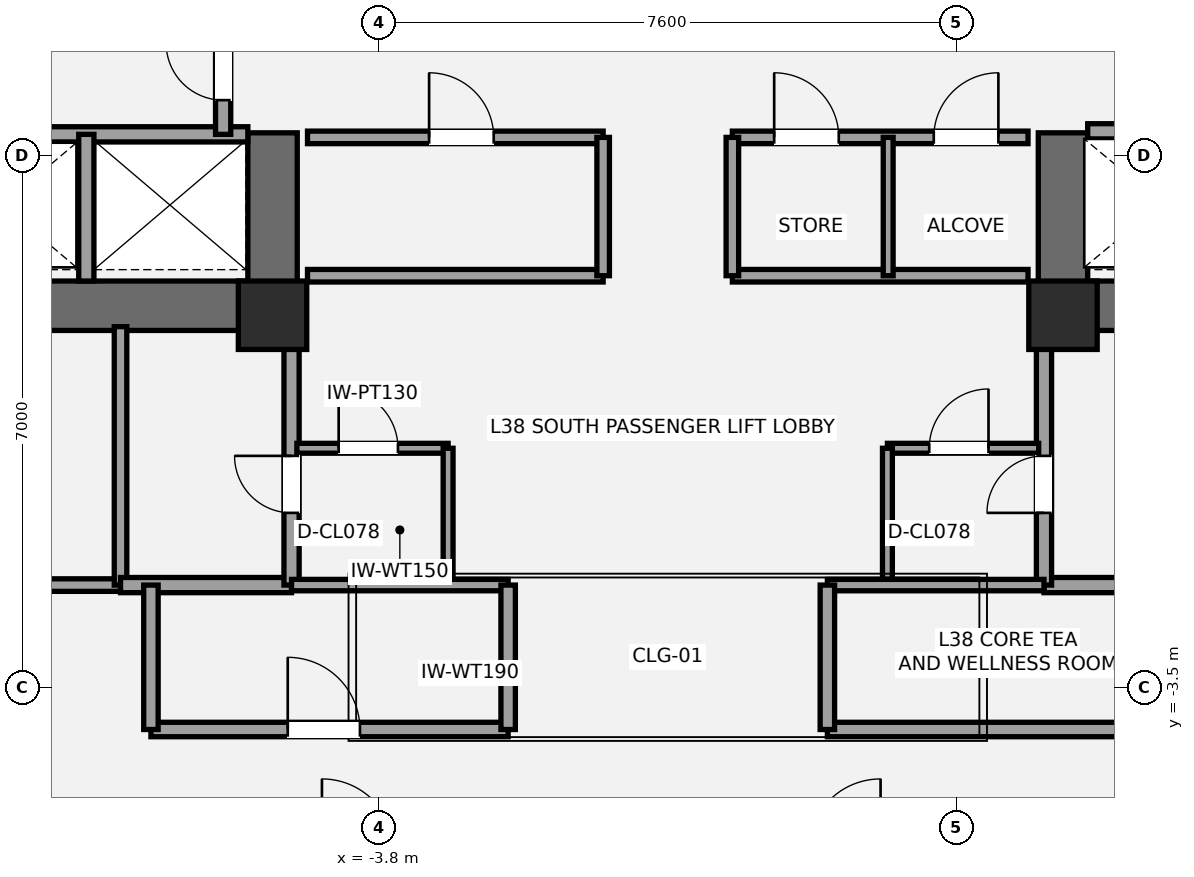
"""IFC4 building model, lengths in metres.
Left out: names, types, materials, properties, quantities, classifications, styles, units other than length and angle.
Written with IfcOpenShell. Run it as: python <this file> out.ifc"""

import sys

from ifc_helpers import new_model, si_unit, direction, frame, frame_2d, origin, origin_2d, place, context, subcontext, project, spatial, rectangle, extrude, element, fill, save


model = new_model("IFC4")
c1 = context("Model", 3, precision=1e-05, world=origin(), true_north=direction((0.0, 1.0)))
c2 = subcontext(c1, "Body", "Model", "MODEL_VIEW")
j1 = project(units=[si_unit("LENGTHUNIT", "METRE"), si_unit("PLANEANGLEUNIT", "RADIAN")], contexts=[c1])
p1 = place(None, origin())
s1 = spatial("IfcSite", under=j1, at=p1, CompositionType="ELEMENT")
p2 = place(p1, origin())
s2 = spatial("IfcBuilding", under=s1, at=p2, CompositionType="ELEMENT")
p3 = place(p2, frame((0.0, 0.0, 143.8)))
s3 = spatial("IfcBuildingStorey", under=s2, at=p3, CompositionType="ELEMENT", Elevation=143.8)
p4 = place(p3, frame((-4.875, 1.525, 0.0), z_axis=(0.0, 0.0, 1.0), x_axis=(-1.0, 0.0, 0.0)))
e1 = element("IfcWall", 1, at=p4, inside=s3, PredefinedType="SHEAR", context=c2, shape_type="SweptSolid", body=[
    extrude(rectangle(XDim=8.925, YDim=0.65, at=frame_2d((4.462, 0.0))), origin(), (0.0, 0.0, 1.0), 3.2),
])
p5 = place(p4, frame((5.425, 0.0, 0.0)))
e2 = element("IfcOpeningElement", 2, at=p5, cuts=e1, PredefinedType="OPENING", context=c2, shape_type="SweptSolid", body=[
    extrude(rectangle(XDim=1.05, YDim=2.15, at=frame_2d((0.525, 1.075))), frame((0.0, 0.335, 0.0), z_axis=(0.0, -1.0, 0.0), x_axis=(1.0, 0.0, 0.0)), (0.0, 0.0, 1.0), 0.67),
])
p6 = place(p4, frame((3.755, 0.0, 0.0)))
e3 = element("IfcOpeningElement", 3, at=p6, cuts=e1, PredefinedType="OPENING", context=c2, shape_type="SweptSolid", body=[
    extrude(rectangle(XDim=1.1, YDim=2.2, at=frame_2d((0.55, 1.1))), frame((0.0, 0.335, 0.0), z_axis=(0.0, -1.0, 0.0), x_axis=(1.0, 0.0, 0.0)), (0.0, 0.0, 1.0), 0.67),
])
p7 = place(p3, frame((-5.2, 1.2, 0.0), z_axis=(0.0, 0.0, 1.0), x_axis=(0.0, 1.0, 0.0)))
e4 = element("IfcWall", 4, at=p7, inside=s3, PredefinedType="SHEAR", context=c2, shape_type="SweptSolid", body=[
    extrude(rectangle(XDim=2.6, YDim=0.65, at=frame_2d((1.3, 0.0))), origin(), (0.0, 0.0, 1.0), 3.2),
])
p8 = place(p3, frame((13.8, 1.525, 0.0), z_axis=(0.0, 0.0, 1.0), x_axis=(-1.0, 0.0, 0.0)))
e5 = element("IfcWall", 5, at=p8, inside=s3, PredefinedType="SHEAR", context=c2, shape_type="SweptSolid", body=[
    extrude(rectangle(XDim=8.925, YDim=0.65, at=frame_2d((4.462, 0.0))), origin(), (0.0, 0.0, 1.0), 3.2),
])
p9 = place(p8, frame((2.45, 0.0, 0.0)))
e6 = element("IfcOpeningElement", 6, at=p9, cuts=e5, PredefinedType="OPENING", context=c2, shape_type="SweptSolid", body=[
    extrude(rectangle(XDim=1.05, YDim=2.15, at=frame_2d((0.525, 1.075))), frame((0.0, 0.335, 0.0), z_axis=(0.0, -1.0, 0.0), x_axis=(1.0, 0.0, 0.0)), (0.0, 0.0, 1.0), 0.67),
])
p10 = place(p8, frame((4.45, 0.0, 0.0)))
e7 = element("IfcOpeningElement", 7, at=p10, cuts=e5, PredefinedType="OPENING", context=c2, shape_type="SweptSolid", body=[
    extrude(rectangle(XDim=1.1, YDim=2.2, at=frame_2d((0.55, 1.1))), frame((0.0, 0.335, 0.0), z_axis=(0.0, -1.0, 0.0), x_axis=(1.0, 0.0, 0.0)), (0.0, 0.0, 1.0), 0.67),
])
p11 = place(p3, frame((5.2, 1.2, 0.0), z_axis=(0.0, 0.0, 1.0), x_axis=(0.0, 1.0, 0.0)))
e8 = element("IfcWall", 8, at=p11, inside=s3, PredefinedType="SHEAR", context=c2, shape_type="SweptSolid", body=[
    extrude(rectangle(XDim=2.6, YDim=0.65, at=frame_2d((1.3, 0.0))), origin(), (0.0, 0.0, 1.0), 3.2),
])
for number, where, z_axis, x_axis in (
    (9, (-5.2, 1.4, 0.0), (0.0, 0.0, 1.0), (1.0, 0.0, 0.0)),
    (10, (5.2, 1.4, 0.0), (0.0, 0.0, 1.0), (1.0, 0.0, 0.0)),
):
    element("IfcColumn", number, at=place(p3, frame(where, z_axis=z_axis, x_axis=x_axis)), inside=s3, PredefinedType="COLUMN", context=c2, shape_type="SweptSolid", body=[
        extrude(rectangle(XDim=0.9, YDim=0.9, at=origin_2d()), origin(), (0.0, 0.0, 1.0), 3.2),
    ])
p12 = place(p3, frame((-13.45, -2.15, 0.0), z_axis=(0.0, 0.0, 1.0), x_axis=(1.0, 0.0, 0.0)))
e11 = element("IfcWall", 11, at=p12, inside=s3, PredefinedType="PARTITIONING", context=c2, shape_type="SweptSolid", body=[
    extrude(rectangle(XDim=6.25, YDim=0.165, at=frame_2d((3.125, 0.0))), origin(), (0.0, 0.0, 1.0), 2.473),
])
p13 = place(p3, frame((-7.2, -2.15, 0.0), z_axis=(0.0, 0.0, 1.0), x_axis=(0.0, 1.0, 0.0)))
e12 = element("IfcWall", 12, at=p13, inside=s3, PredefinedType="PARTITIONING", context=c2, shape_type="SweptSolid", body=[
    extrude(rectangle(XDim=3.4, YDim=0.165, at=frame_2d((1.7, 0.0))), origin(), (0.0, 0.0, 1.0), 2.473),
])
p14 = place(p3, frame((-7.2, -2.15, 0.0), z_axis=(0.0, 0.0, 1.0), x_axis=(1.0, 0.0, 0.0)))
e13 = element("IfcWall", 13, at=p14, inside=s3, PredefinedType="SOLIDWALL", context=c2, shape_type="SweptSolid", body=[
    extrude(rectangle(XDim=2.25, YDim=0.2, at=frame_2d((1.125, 0.0))), origin(), (0.0, 0.0, 1.0), 3.02),
])
p15 = place(p3, frame((-4.95, -2.15, 0.0), z_axis=(0.0, 0.0, 1.0), x_axis=(0.0, 1.0, 0.0)))
e14 = element("IfcWall", 14, at=p15, inside=s3, PredefinedType="SOLIDWALL", context=c2, shape_type="SweptSolid", body=[
    extrude(rectangle(XDim=3.4, YDim=0.2, at=frame_2d((1.7, 0.0))), origin(), (0.0, 0.0, 1.0), 2.473),
])
p16 = place(p15, frame((0.95, 0.0, 0.0)))
e15 = element("IfcOpeningElement", 15, at=p16, cuts=e14, PredefinedType="OPENING", context=c2, shape_type="SweptSolid", body=[
    extrude(rectangle(XDim=0.75, YDim=2.1, at=frame_2d((0.375, 1.05))), frame((0.0, 0.11, 0.0), z_axis=(0.0, -1.0, 0.0), x_axis=(1.0, 0.0, 0.0)), (0.0, 0.0, 1.0), 0.22),
])
p17 = place(p3, frame((4.95, -2.15, 0.0), z_axis=(0.0, 0.0, 1.0), x_axis=(1.0, 0.0, 0.0)))
e16 = element("IfcWall", 16, at=p17, inside=s3, PredefinedType="SOLIDWALL", context=c2, shape_type="SweptSolid", body=[
    extrude(rectangle(XDim=2.25, YDim=0.2, at=frame_2d((1.125, 0.0))), origin(), (0.0, 0.0, 1.0), 3.02),
])
p18 = place(p3, frame((4.95, -2.15, 0.0), z_axis=(0.0, 0.0, 1.0), x_axis=(0.0, 1.0, 0.0)))
e17 = element("IfcWall", 17, at=p18, inside=s3, PredefinedType="SOLIDWALL", context=c2, shape_type="SweptSolid", body=[
    extrude(rectangle(XDim=3.4, YDim=0.2, at=frame_2d((1.7, 0.0))), origin(), (0.0, 0.0, 1.0), 2.473),
])
p19 = place(p18, frame((0.95, 0.0, 0.0)))
e18 = element("IfcOpeningElement", 18, at=p19, cuts=e17, PredefinedType="OPENING", context=c2, shape_type="SweptSolid", body=[
    extrude(rectangle(XDim=0.75, YDim=2.1, at=frame_2d((0.375, 1.05))), frame((0.0, 0.11, 0.0), z_axis=(0.0, -1.0, 0.0), x_axis=(1.0, 0.0, 0.0)), (0.0, 0.0, 1.0), 0.22),
])
p20 = place(p3, frame((-4.88, -0.35, 0.0), z_axis=(0.0, 0.0, 1.0), x_axis=(1.0, 0.0, 0.0)))
e19 = element("IfcWall", 19, at=p20, inside=s3, PredefinedType="PARTITIONING", context=c2, shape_type="SweptSolid", body=[
    extrude(rectangle(XDim=1.99, YDim=0.13, at=frame_2d((0.995, 0.0))), origin(), (0.0, 0.0, 1.0), 3.02),
])
p21 = place(p20, frame((0.55, 0.0, 0.0)))
e20 = element("IfcOpeningElement", 20, at=p21, cuts=e19, PredefinedType="OPENING", context=c2, shape_type="SweptSolid", body=[
    extrude(rectangle(XDim=0.78, YDim=2.1, at=frame_2d((0.39, 1.05))), frame((0.0, 0.075, 0.0), z_axis=(0.0, -1.0, 0.0), x_axis=(1.0, 0.0, 0.0)), (0.0, 0.0, 1.0), 0.15),
])
p22 = place(p3, frame((-2.89, -2.15, 0.0), z_axis=(0.0, 0.0, 1.0), x_axis=(0.0, 1.0, 0.0)))
e21 = element("IfcWall", 21, at=p22, inside=s3, PredefinedType="PARTITIONING", context=c2, shape_type="SweptSolid", body=[
    extrude(rectangle(XDim=1.8, YDim=0.13, at=frame_2d((0.9, 0.0))), origin(), (0.0, 0.0, 1.0), 3.02),
])
p23 = place(p3, frame((2.89, -0.35, 0.0), z_axis=(0.0, 0.0, 1.0), x_axis=(1.0, 0.0, 0.0)))
e22 = element("IfcWall", 22, at=p23, inside=s3, PredefinedType="PARTITIONING", context=c2, shape_type="SweptSolid", body=[
    extrude(rectangle(XDim=1.99, YDim=0.13, at=frame_2d((0.995, 0.0))), origin(), (0.0, 0.0, 1.0), 3.02),
])
p24 = place(p23, frame((0.55, 0.0, 0.0)))
e23 = element("IfcOpeningElement", 23, at=p24, cuts=e22, PredefinedType="OPENING", context=c2, shape_type="SweptSolid", body=[
    extrude(rectangle(XDim=0.78, YDim=2.1, at=frame_2d((0.39, 1.05))), frame((0.0, 0.075, 0.0), z_axis=(0.0, -1.0, 0.0), x_axis=(1.0, 0.0, 0.0)), (0.0, 0.0, 1.0), 0.15),
])
p25 = place(p3, frame((2.89, -2.15, 0.0), z_axis=(0.0, 0.0, 1.0), x_axis=(0.0, 1.0, 0.0)))
e24 = element("IfcWall", 24, at=p25, inside=s3, PredefinedType="PARTITIONING", context=c2, shape_type="SweptSolid", body=[
    extrude(rectangle(XDim=1.8, YDim=0.13, at=frame_2d((0.9, 0.0))), origin(), (0.0, 0.0, 1.0), 3.02),
])
p26 = place(p3, frame((-9.78, 3.78, 0.0), z_axis=(0.0, 0.0, 1.0), x_axis=(1.0, 0.0, 0.0)))
e25 = element("IfcWall", 25, at=p26, inside=s3, PredefinedType="SOLIDWALL", context=c2, shape_type="SweptSolid", body=[
    extrude(rectangle(XDim=4.255, YDim=0.2, at=frame_2d((2.127, 0.0))), origin(), (0.0, 0.0, 1.0), 3.02),
])
p27 = place(p3, frame((-7.65, 1.85, 0.0), z_axis=(0.0, 0.0, 1.0), x_axis=(0.0, 1.0, 0.0)))
e26 = element("IfcWall", 26, at=p27, inside=s3, PredefinedType="SOLIDWALL", context=c2, shape_type="SweptSolid", body=[
    extrude(rectangle(XDim=1.93, YDim=0.2, at=frame_2d((0.965, 0.0))), origin(), (0.0, 0.0, 1.0), 3.02),
])
p28 = place(p3, frame((-5.85, 3.78, 0.0), z_axis=(0.0, 0.0, 1.0), x_axis=(0.0, 1.0, 0.0)))
e27 = element("IfcWall", 27, at=p28, inside=s3, PredefinedType="SOLIDWALL", context=c2, shape_type="SweptSolid", body=[
    extrude(rectangle(XDim=1.69, YDim=0.2, at=frame_2d((0.845, 0.0))), origin(), (0.0, 0.0, 1.0), 3.02),
])
p29 = place(p28, frame((0.45, 0.0, 0.0)))
e28 = element("IfcOpeningElement", 28, at=p29, cuts=e27, PredefinedType="OPENING", context=c2, shape_type="SweptSolid", body=[
    extrude(rectangle(XDim=0.75, YDim=2.1, at=frame_2d((0.375, 1.05))), frame((0.0, 0.11, 0.0), z_axis=(0.0, -1.0, 0.0), x_axis=(1.0, 0.0, 0.0)), (0.0, 0.0, 1.0), 0.22),
])
p30 = place(p3, frame((5.525, 3.82, 0.0), z_axis=(0.0, 0.0, 1.0), x_axis=(1.0, 0.0, 0.0)))
e29 = element("IfcWall", 29, at=p30, inside=s3, PredefinedType="SOLIDWALL", context=c2, shape_type="SweptSolid", body=[
    extrude(rectangle(XDim=4.255, YDim=0.2, at=frame_2d((2.127, 0.0))), origin(), (0.0, 0.0, 1.0), 3.02),
])
p31 = place(p30, frame((0.65, 0.0, 0.0)))
e30 = element("IfcOpeningElement", 30, at=p31, cuts=e29, PredefinedType="OPENING", context=c2, shape_type="SweptSolid", body=[
    extrude(rectangle(XDim=1.2, YDim=2.2, at=frame_2d((0.6, 1.1))), frame((0.0, 0.11, 0.0), z_axis=(0.0, -1.0, 0.0), x_axis=(1.0, 0.0, 0.0)), (0.0, 0.0, 1.0), 0.22),
])
p32 = place(p3, frame((-4.74, 1.92, 0.0), z_axis=(0.0, 0.0, 1.0), x_axis=(1.0, 0.0, 0.0)))
e31 = element("IfcWall", 31, at=p32, inside=s3, PredefinedType="PARTITIONING", context=c2, shape_type="SweptSolid", body=[
    extrude(rectangle(XDim=3.89, YDim=0.165, at=frame_2d((1.945, 0.0))), origin(), (0.0, 0.0, 1.0), 2.16),
])
p33 = place(p3, frame((-4.74, 3.74, 0.0), z_axis=(0.0, 0.0, 1.0), x_axis=(1.0, 0.0, 0.0)))
e32 = element("IfcWall", 32, at=p33, inside=s3, PredefinedType="PARTITIONING", context=c2, shape_type="SweptSolid", body=[
    extrude(rectangle(XDim=3.89, YDim=0.165, at=frame_2d((1.945, 0.0))), origin(), (0.0, 0.0, 1.0), 3.02),
])
p34 = place(p33, frame((1.6, 0.0, 0.0)))
e33 = element("IfcOpeningElement", 33, at=p34, cuts=e32, PredefinedType="OPENING", context=c2, shape_type="SweptSolid", body=[
    extrude(rectangle(XDim=0.85, YDim=2.1, at=frame_2d((0.425, 1.05))), frame((0.0, 0.093, 0.0), z_axis=(0.0, -1.0, 0.0), x_axis=(1.0, 0.0, 0.0)), (0.0, 0.0, 1.0), 0.185),
])
p35 = place(p3, frame((-0.85, 1.92, 0.0), z_axis=(0.0, 0.0, 1.0), x_axis=(0.0, 1.0, 0.0)))
e34 = element("IfcWall", 34, at=p35, inside=s3, PredefinedType="PARTITIONING", context=c2, shape_type="SweptSolid", body=[
    extrude(rectangle(XDim=1.82, YDim=0.165, at=frame_2d((0.91, 0.0))), origin(), (0.0, 0.0, 1.0), 3.02),
])
p36 = place(p3, frame((0.85, 1.92, 0.0), z_axis=(0.0, 0.0, 1.0), x_axis=(1.0, 0.0, 0.0)))
e35 = element("IfcWall", 35, at=p36, inside=s3, PredefinedType="PARTITIONING", context=c2, shape_type="SweptSolid", body=[
    extrude(rectangle(XDim=3.89, YDim=0.165, at=frame_2d((1.945, 0.0))), origin(), (0.0, 0.0, 1.0), 2.16),
])
p37 = place(p3, frame((0.85, 3.74, 0.0), z_axis=(0.0, 0.0, 1.0), x_axis=(1.0, 0.0, 0.0)))
e36 = element("IfcWall", 36, at=p37, inside=s3, PredefinedType="PARTITIONING", context=c2, shape_type="SweptSolid", body=[
    extrude(rectangle(XDim=3.89, YDim=0.165, at=frame_2d((1.945, 0.0))), origin(), (0.0, 0.0, 1.0), 3.02),
])
p38 = place(p37, frame((0.55, 0.0, 0.0)))
e37 = element("IfcOpeningElement", 37, at=p38, cuts=e36, PredefinedType="OPENING", context=c2, shape_type="SweptSolid", body=[
    extrude(rectangle(XDim=0.85, YDim=2.1, at=frame_2d((0.425, 1.05))), frame((0.0, 0.093, 0.0), z_axis=(0.0, -1.0, 0.0), x_axis=(1.0, 0.0, 0.0)), (0.0, 0.0, 1.0), 0.185),
])
p39 = place(p37, frame((2.65, 0.0, 0.0)))
e38 = element("IfcOpeningElement", 38, at=p39, cuts=e36, PredefinedType="OPENING", context=c2, shape_type="SweptSolid", body=[
    extrude(rectangle(XDim=0.85, YDim=2.1, at=frame_2d((0.425, 1.05))), frame((0.0, 0.093, 0.0), z_axis=(0.0, -1.0, 0.0), x_axis=(1.0, 0.0, 0.0)), (0.0, 0.0, 1.0), 0.185),
])
p40 = place(p3, frame((0.85, 1.92, 0.0), z_axis=(0.0, 0.0, 1.0), x_axis=(0.0, 1.0, 0.0)))
e39 = element("IfcWall", 39, at=p40, inside=s3, PredefinedType="PARTITIONING", context=c2, shape_type="SweptSolid", body=[
    extrude(rectangle(XDim=1.82, YDim=0.165, at=frame_2d((0.91, 0.0))), origin(), (0.0, 0.0, 1.0), 3.02),
])
p41 = place(p3, frame((2.9, 1.92, 0.0), z_axis=(0.0, 0.0, 1.0), x_axis=(0.0, 1.0, 0.0)))
e40 = element("IfcWall", 40, at=p41, inside=s3, PredefinedType="PARTITIONING", context=c2, shape_type="SweptSolid", body=[
    extrude(rectangle(XDim=1.82, YDim=0.13, at=frame_2d((0.91, 0.0))), origin(), (0.0, 0.0, 1.0), 3.02),
])
p42 = place(p3, frame((-6.8, -4.05, 0.0), z_axis=(0.0, 0.0, 1.0), x_axis=(1.0, 0.0, 0.0)))
e41 = element("IfcWall", 41, at=p42, inside=s3, PredefinedType="PLUMBINGWALL", context=c2, shape_type="SweptSolid", body=[
    extrude(rectangle(XDim=4.7, YDim=0.19, at=frame_2d((2.35, 0.0))), origin(), (0.0, 0.0, 1.0), 2.555),
])
p43 = place(p42, frame((1.8, 0.0, 0.0)))
e42 = element("IfcOpeningElement", 42, at=p43, cuts=e41, PredefinedType="OPENING", context=c2, shape_type="SweptSolid", body=[
    extrude(rectangle(XDim=0.95, YDim=2.15, at=frame_2d((0.475, 1.075))), frame((0.0, 0.105, 0.0), z_axis=(0.0, -1.0, 0.0), x_axis=(1.0, 0.0, 0.0)), (0.0, 0.0, 1.0), 0.21),
])
p44 = place(p3, frame((-4.95, -2.15, 0.0), z_axis=(0.0, 0.0, 1.0), x_axis=(1.0, 0.0, 0.0)))
e43 = element("IfcWall", 43, at=p44, inside=s3, PredefinedType="PLUMBINGWALL", context=c2, shape_type="SweptSolid", body=[
    extrude(rectangle(XDim=2.85, YDim=0.15, at=frame_2d((1.425, 0.0))), origin(), (0.0, 0.0, 1.0), 3.02),
])
p45 = place(p3, frame((-6.8, -4.05, 0.0), z_axis=(0.0, 0.0, 1.0), x_axis=(0.0, 1.0, 0.0)))
e44 = element("IfcWall", 44, at=p45, inside=s3, PredefinedType="PLUMBINGWALL", context=c2, shape_type="SweptSolid", body=[
    extrude(rectangle(XDim=1.9, YDim=0.19, at=frame_2d((0.95, 0.0))), origin(), (0.0, 0.0, 1.0), 2.473),
])
p46 = place(p3, frame((-2.1, -4.05, 0.0), z_axis=(0.0, 0.0, 1.0), x_axis=(0.0, 1.0, 0.0)))
e45 = element("IfcWall", 45, at=p46, inside=s3, PredefinedType="PLUMBINGWALL", context=c2, shape_type="SweptSolid", body=[
    extrude(rectangle(XDim=1.9, YDim=0.19, at=frame_2d((0.95, 0.0))), origin(), (0.0, 0.0, 1.0), 3.02),
])
p47 = place(p3, frame((2.1, -4.05, 0.0), z_axis=(0.0, 0.0, 1.0), x_axis=(1.0, 0.0, 0.0)))
e46 = element("IfcWall", 46, at=p47, inside=s3, PredefinedType="PLUMBINGWALL", context=c2, shape_type="SweptSolid", body=[
    extrude(rectangle(XDim=11.35, YDim=0.19, at=frame_2d((5.675, 0.0))), origin(), (0.0, 0.0, 1.0), 2.555),
])
p48 = place(p47, frame((5.2, 0.0, 0.0)))
e47 = element("IfcOpeningElement", 47, at=p48, cuts=e46, PredefinedType="OPENING", context=c2, shape_type="SweptSolid", body=[
    extrude(rectangle(XDim=0.9, YDim=2.1, at=frame_2d((0.45, 1.05))), frame((0.0, 0.105, 0.0), z_axis=(0.0, -1.0, 0.0), x_axis=(1.0, 0.0, 0.0)), (0.0, 0.0, 1.0), 0.21),
])
p49 = place(p3, frame((2.1, -2.15, 0.0), z_axis=(0.0, 0.0, 1.0), x_axis=(1.0, 0.0, 0.0)))
e48 = element("IfcWall", 48, at=p49, inside=s3, PredefinedType="PLUMBINGWALL", context=c2, shape_type="SweptSolid", body=[
    extrude(rectangle(XDim=2.85, YDim=0.15, at=frame_2d((1.425, 0.0))), origin(), (0.0, 0.0, 1.0), 3.02),
])
p50 = place(p3, frame((2.1, -4.05, 0.0), z_axis=(0.0, 0.0, 1.0), x_axis=(0.0, 1.0, 0.0)))
e49 = element("IfcWall", 49, at=p50, inside=s3, PredefinedType="PLUMBINGWALL", context=c2, shape_type="SweptSolid", body=[
    extrude(rectangle(XDim=1.9, YDim=0.19, at=frame_2d((0.95, 0.0))), origin(), (0.0, 0.0, 1.0), 3.02),
])
p51 = place(p16, origin())
e50 = element("IfcDoor", 50, at=p51, inside=s3, OperationType="SINGLE_SWING_RIGHT", PredefinedType="DOOR", context=c2, shape_type="SweptSolid", body=[
    extrude(rectangle(XDim=0.75, YDim=2.1, at=frame_2d((0.375, 1.05))), frame((0.0, 0.025, 0.0), z_axis=(0.0, -1.0, 0.0), x_axis=(1.0, 0.0, 0.0)), (0.0, 0.0, 1.0), 0.05),
])
fill(e15, e50)
p52 = place(p19, origin())
e51 = element("IfcDoor", 51, at=p52, inside=s3, OperationType="SINGLE_SWING_LEFT", PredefinedType="DOOR", context=c2, shape_type="SweptSolid", body=[
    extrude(rectangle(XDim=0.75, YDim=2.1, at=frame_2d((0.375, 1.05))), frame((0.0, 0.025, 0.0), z_axis=(0.0, -1.0, 0.0), x_axis=(1.0, 0.0, 0.0)), (0.0, 0.0, 1.0), 0.05),
])
fill(e18, e51)
p53 = place(p21, origin())
e52 = element("IfcDoor", 52, at=p53, inside=s3, OperationType="SINGLE_SWING_LEFT", PredefinedType="DOOR", context=c2, shape_type="SweptSolid", body=[
    extrude(rectangle(XDim=0.78, YDim=2.1, at=frame_2d((0.39, 1.05))), frame((0.0, 0.025, 0.0), z_axis=(0.0, -1.0, 0.0), x_axis=(1.0, 0.0, 0.0)), (0.0, 0.0, 1.0), 0.05),
])
fill(e20, e52)
p54 = place(p24, origin())
e53 = element("IfcDoor", 53, at=p54, inside=s3, OperationType="SINGLE_SWING_RIGHT", PredefinedType="DOOR", context=c2, shape_type="SweptSolid", body=[
    extrude(rectangle(XDim=0.78, YDim=2.1, at=frame_2d((0.39, 1.05))), frame((0.0, 0.025, 0.0), z_axis=(0.0, -1.0, 0.0), x_axis=(1.0, 0.0, 0.0)), (0.0, 0.0, 1.0), 0.05),
])
fill(e23, e53)
p55 = place(p29, origin())
e54 = element("IfcDoor", 54, at=p55, inside=s3, OperationType="SINGLE_SWING_RIGHT", PredefinedType="DOOR", context=c2, shape_type="SweptSolid", body=[
    extrude(rectangle(XDim=0.75, YDim=2.1, at=frame_2d((0.375, 1.05))), frame((0.0, 0.025, 0.0), z_axis=(0.0, -1.0, 0.0), x_axis=(1.0, 0.0, 0.0)), (0.0, 0.0, 1.0), 0.05),
])
fill(e28, e54)
p56 = place(p34, origin())
e55 = element("IfcDoor", 55, at=p56, inside=s3, OperationType="SINGLE_SWING_LEFT", PredefinedType="DOOR", context=c2, shape_type="SweptSolid", body=[
    extrude(rectangle(XDim=0.85, YDim=2.1, at=frame_2d((0.425, 1.05))), frame((0.0, 0.025, 0.0), z_axis=(0.0, -1.0, 0.0), x_axis=(1.0, 0.0, 0.0)), (0.0, 0.0, 1.0), 0.05),
])
fill(e33, e55)
p57 = place(p38, origin())
e56 = element("IfcDoor", 56, at=p57, inside=s3, OperationType="SINGLE_SWING_LEFT", PredefinedType="DOOR", context=c2, shape_type="SweptSolid", body=[
    extrude(rectangle(XDim=0.85, YDim=2.1, at=frame_2d((0.425, 1.05))), frame((0.0, 0.025, 0.0), z_axis=(0.0, -1.0, 0.0), x_axis=(1.0, 0.0, 0.0)), (0.0, 0.0, 1.0), 0.05),
])
fill(e37, e56)
p58 = place(p39, origin())
e57 = element("IfcDoor", 57, at=p58, inside=s3, OperationType="SINGLE_SWING_RIGHT", PredefinedType="DOOR", context=c2, shape_type="SweptSolid", body=[
    extrude(rectangle(XDim=0.85, YDim=2.1, at=frame_2d((0.425, 1.05))), frame((0.0, 0.025, 0.0), z_axis=(0.0, -1.0, 0.0), x_axis=(1.0, 0.0, 0.0)), (0.0, 0.0, 1.0), 0.05),
])
fill(e38, e57)
p59 = place(p43, origin())
e58 = element("IfcDoor", 58, at=p59, inside=s3, OperationType="SINGLE_SWING_LEFT", PredefinedType="DOOR", context=c2, shape_type="SweptSolid", body=[
    extrude(rectangle(XDim=0.95, YDim=2.15, at=frame_2d((0.475, 1.075))), frame((0.0, 0.025, 0.0), z_axis=(0.0, -1.0, 0.0), x_axis=(1.0, 0.0, 0.0)), (0.0, 0.0, 1.0), 0.05),
])
fill(e42, e58)
save(model, sys.argv[1])
